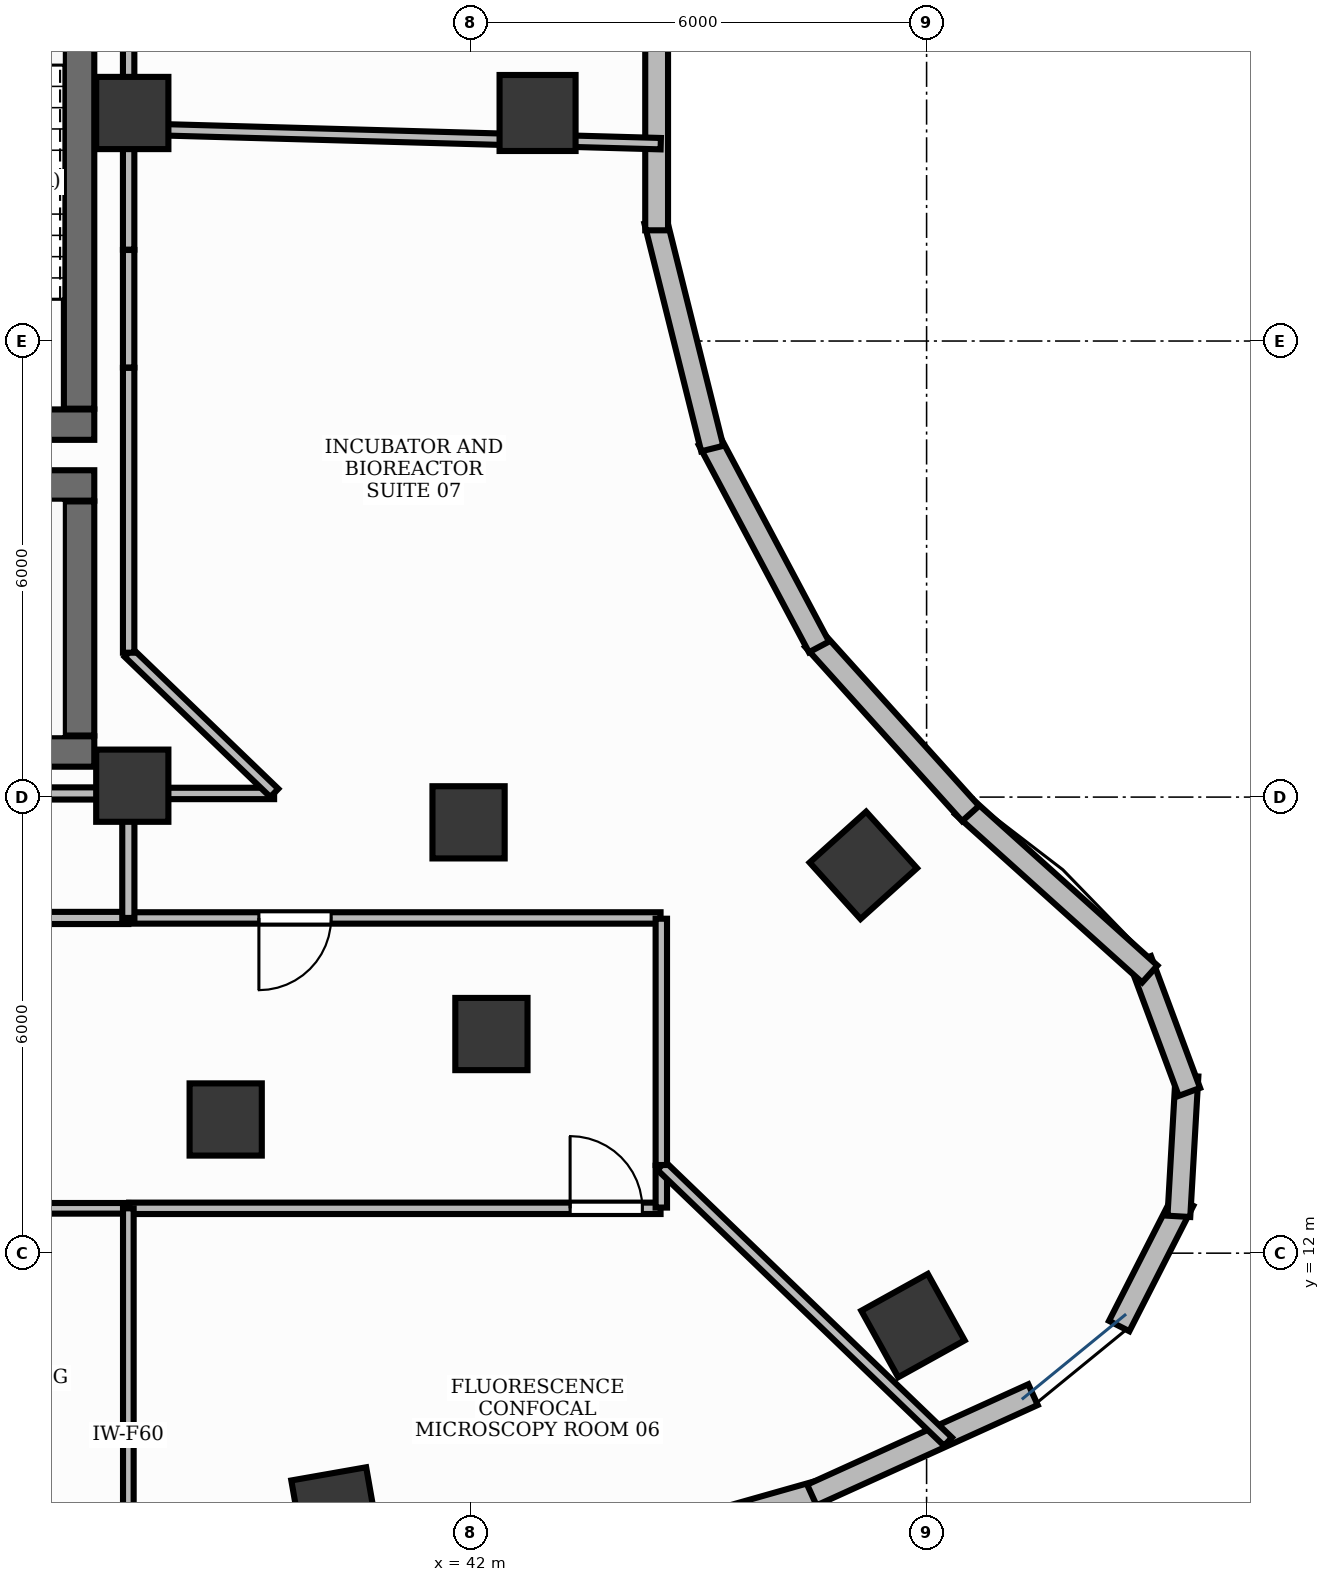
"""IFC4 building model, lengths in metres.
Left out: names, types, materials, properties, quantities, classifications, styles, units other than length and angle.
Written with IfcOpenShell. Run it as: python <this file> out.ifc"""

import sys

from ifc_helpers import new_model, si_unit, direction, frame, frame_2d, origin, origin_2d, place, context, subcontext, project, spatial, rectangle, extrude, element, fill, save


model = new_model("IFC4")
c1 = context("Model", 3, precision=1e-05, world=origin(), true_north=direction((0.0, 1.0)))
c2 = subcontext(c1, "Body", "Model", "MODEL_VIEW")
j1 = project(units=[si_unit("LENGTHUNIT", "METRE"), si_unit("PLANEANGLEUNIT", "RADIAN")], contexts=[c1])
p1 = place(None, origin())
s1 = spatial("IfcSite", under=j1, at=p1, CompositionType="ELEMENT")
p2 = place(p1, origin())
s2 = spatial("IfcBuilding", under=s1, at=p2, CompositionType="ELEMENT")
p3 = place(p2, frame((0.0, 0.0, 162.6)))
s3 = spatial("IfcBuildingStorey", under=s2, at=p3, CompositionType="ELEMENT", Elevation=162.6)
p4 = place(p3, frame((28.852, 18.6, 0.0), z_axis=(0.0, 0.0, 1.0), x_axis=(1.0, 0.0, 0.0)))
e1 = element("IfcWall", 1, at=p4, inside=s3, PredefinedType="SHEAR", context=c2, shape_type="SweptSolid", body=[
    extrude(rectangle(XDim=8.198, YDim=0.4, at=frame_2d((4.099, 0.0))), origin(), (0.0, 0.0, 1.0), 3.79),
])
p5 = place(p3, frame((28.4, 22.1, 0.0), z_axis=(0.0, 0.0, 1.0), x_axis=(1.0, 0.0, 0.0)))
e2 = element("IfcWall", 2, at=p5, inside=s3, PredefinedType="SHEAR", context=c2, shape_type="SweptSolid", body=[
    extrude(rectangle(XDim=8.65, YDim=0.4, at=frame_2d((4.325, 0.0))), origin(), (0.0, 0.0, 1.0), 3.79),
])
p6 = place(p3, frame((36.85, 18.81, 0.0), z_axis=(0.0, 0.0, 1.0), x_axis=(0.0, 1.0, 0.0)))
e3 = element("IfcWall", 3, at=p6, inside=s3, PredefinedType="SHEAR", context=c2, shape_type="SweptSolid", body=[
    extrude(rectangle(XDim=3.08, YDim=0.4, at=frame_2d((1.54, 0.0))), origin(), (0.0, 0.0, 1.0), 3.79),
])
p7 = place(p3, frame((33.15, 22.9, 0.0), z_axis=(0.0, 0.0, 1.0), x_axis=(1.0, 0.0, 0.0)))
e4 = element("IfcWall", 4, at=p7, inside=s3, PredefinedType="SHEAR", context=c2, shape_type="SweptSolid", body=[
    extrude(rectangle(XDim=3.9, YDim=0.4, at=frame_2d((1.95, 0.0))), origin(), (0.0, 0.0, 1.0), 3.79),
])
p8 = place(p3, frame((36.85, 23.11, 0.0), z_axis=(0.0, 0.0, 1.0), x_axis=(0.0, 1.0, 0.0)))
e5 = element("IfcWall", 5, at=p8, inside=s3, PredefinedType="SHEAR", context=c2, shape_type="SweptSolid", body=[
    extrude(rectangle(XDim=7.78, YDim=0.4, at=frame_2d((3.89, 0.0))), origin(), (0.0, 0.0, 1.0), 3.79),
])
for number, where, z_axis, x_axis in (
    (6, (37.55, 18.15, -0.0), (0.0, 0.0, 1.0), (1.0, 0.0, 0.0)),
    (7, (37.55, 27.0, -0.0), (0.0, 0.0, 1.0), (1.0, 0.0, 0.0)),
):
    element("IfcColumn", number, at=place(p3, frame(where, z_axis=z_axis, x_axis=x_axis)), inside=s3, PredefinedType="PILASTER", context=c2, shape_type="SweptSolid", body=[
        extrude(rectangle(XDim=0.95, YDim=0.95, at=origin_2d()), origin(), (0.0, 0.0, 1.0), 3.791),
    ])
p9 = place(p3, frame((40.221, 8.604, -0.0), z_axis=(0.0, 0.0, 1.0), x_axis=(0.984868307662, 0.173304404339, 0.0)))
e8 = element("IfcColumn", 8, at=p9, inside=s3, PredefinedType="COLUMN", context=c2, shape_type="SweptSolid", body=[
    extrude(rectangle(XDim=1.0, YDim=1.0, at=origin_2d()), origin(), (0.0, 0.0, 1.0), 3.791),
])
p10 = place(p3, frame((38.779, 13.759, -0.0), z_axis=(0.0, 0.0, 1.0), x_axis=(1.0, 0.0, 0.0)))
e9 = element("IfcColumn", 9, at=p10, inside=s3, PredefinedType="COLUMN", context=c2, shape_type="SweptSolid", body=[
    extrude(rectangle(XDim=0.95, YDim=0.95, at=origin_2d()), origin(), (0.0, 0.0, 1.0), 3.791),
])
p11 = place(p3, frame((47.821, 11.047, -0.0), z_axis=(0.0, 0.0, 1.0), x_axis=(0.874535078577, 0.484962262797, 0.0)))
e10 = element("IfcColumn", 10, at=p11, inside=s3, PredefinedType="COLUMN", context=c2, shape_type="SweptSolid", body=[
    extrude(rectangle(XDim=1.0, YDim=1.0, at=origin_2d()), origin(), (0.0, 0.0, 1.0), 3.791),
])
p12 = place(p3, frame((42.275, 14.883, -0.0), z_axis=(0.0, 0.0, 1.0), x_axis=(1.0, 0.0, 0.0)))
e11 = element("IfcColumn", 11, at=p12, inside=s3, PredefinedType="COLUMN", context=c2, shape_type="SweptSolid", body=[
    extrude(rectangle(XDim=0.95, YDim=0.95, at=origin_2d()), origin(), (0.0, 0.0, 1.0), 3.791),
])
p13 = place(p3, frame((47.167, 17.102, -0.0), z_axis=(0.0, 0.0, 1.0), x_axis=(-0.669130606359, 0.743144825477, 0.0)))
e12 = element("IfcColumn", 12, at=p13, inside=s3, PredefinedType="COLUMN", context=c2, shape_type="SweptSolid", body=[
    extrude(rectangle(XDim=1.0, YDim=1.0, at=origin_2d()), origin(), (0.0, 0.0, 1.0), 3.791),
])
p14 = place(p3, frame((41.974, 17.668, -0.0), z_axis=(0.0, 0.0, 1.0), x_axis=(1.0, 0.0, 0.0)))
e13 = element("IfcColumn", 13, at=p14, inside=s3, PredefinedType="COLUMN", context=c2, shape_type="SweptSolid", body=[
    extrude(rectangle(XDim=0.95, YDim=0.95, at=origin_2d()), origin(), (0.0, 0.0, 1.0), 3.791),
])
p15 = place(p3, frame((42.882, 27.0, -0.0), z_axis=(0.0, 0.0, 1.0), x_axis=(0.0, 1.0, 0.0)))
e14 = element("IfcColumn", 14, at=p15, inside=s3, PredefinedType="COLUMN", context=c2, shape_type="SweptSolid", body=[
    extrude(rectangle(XDim=1.0, YDim=1.0, at=origin_2d()), origin(), (0.0, 0.0, 1.0), 3.791),
])
p16 = place(p3, frame((40.493, 7.134, 0.0), z_axis=(0.0, 0.0, 1.0), x_axis=(0.962163849422, 0.272471515694, 0.0)))
e15 = element("IfcWall", 15, at=p16, inside=s3, PredefinedType="STANDARD", context=c2, shape_type="SweptSolid", body=[
    extrude(rectangle(XDim=6.409, YDim=0.3, at=frame_2d((3.205, 0.0))), origin(), (0.0, 0.0, 1.0), 3.79),
])
p17 = place(p3, frame((46.49, 8.818, 0.0), z_axis=(0.0, 0.0, 1.0), x_axis=(0.910633193525, 0.413215666268, 0.0)))
e16 = element("IfcWall", 16, at=p17, inside=s3, PredefinedType="STANDARD", context=c2, shape_type="SweptSolid", body=[
    extrude(rectangle(XDim=3.195, YDim=0.3, at=frame_2d((1.598, 0.0))), origin(), (0.0, 0.0, 1.0), 3.79),
])
for number, where, z_axis, x_axis in (
    (17, (50.534, 11.041, 0.0), (0.0, 0.0, 1.0), (0.454, 0.891, 0.0)),
    (18, (51.319, 12.484, 0.0), (0.0, 0.0, 1.0), (0.057, 0.998, 0.0)),
    (19, (51.458, 14.121, 0.0), (0.0, 0.0, 1.0), (-0.349, 0.937, 0.0)),
):
    element("IfcWall", number, at=place(p3, frame(where, z_axis=z_axis, x_axis=x_axis)), inside=s3, PredefinedType="STANDARD", context=c2, shape_type="SweptSolid", body=[
        extrude(rectangle(XDim=1.852, YDim=0.3, at=frame_2d((0.926, 0.0))), origin(), (0.0, 0.0, 1.0), 3.79),
    ])
p18 = place(p3, frame((50.936, 15.673, 0.0), z_axis=(0.0, 0.0, 1.0), x_axis=(-0.743341827472, 0.668911748687, 0.0)))
e20 = element("IfcWall", 20, at=p18, inside=s3, PredefinedType="STANDARD", context=c2, shape_type="SweptSolid", body=[
    extrude(rectangle(XDim=3.31, YDim=0.3, at=frame_2d((1.655, 0.0))), origin(), (0.0, 0.0, 1.0), 3.79),
])
for number, where, z_axis, x_axis in (
    (21, (48.579, 17.784, 0.0), (0.0, 0.0, 1.0), (-0.669, 0.743, 0.0)),
    (22, (46.584, 19.976, 0.0), (0.0, 0.0, 1.0), (-0.469, 0.883, 0.0)),
    (23, (45.18, 22.585, 0.0), (0.0, 0.0, 1.0), (-0.242, 0.97, 0.0)),
    (24, (44.448, 25.457, 0.0), (0.0, 0.0, 1.0), (0.0, 1.0, 0.0)),
):
    element("IfcWall", number, at=place(p3, frame(where, z_axis=z_axis, x_axis=x_axis)), inside=s3, PredefinedType="STANDARD", context=c2, shape_type="SweptSolid", body=[
        extrude(rectangle(XDim=3.087, YDim=0.3, at=frame_2d((1.543, 0.0))), origin(), (0.0, 0.0, 1.0), 3.79),
    ])
p19 = place(p3, frame((37.498, 16.41, 0.0), z_axis=(0.0, 0.0, 1.0), x_axis=(-1.0, 0.0, 0.0)))
e25 = element("IfcWall", 25, at=p19, inside=s3, PredefinedType="PARTITIONING", context=c2, shape_type="SweptSolid", body=[
    extrude(rectangle(XDim=8.498, YDim=0.16, at=frame_2d((4.249, 0.0))), origin(), (0.0, 0.0, 1.0), 2.8),
])
p20 = place(p19, frame((3.372, 0.0, 0.0)))
e26 = element("IfcOpeningElement", 26, at=p20, cuts=e25, PredefinedType="OPENING", context=c2, shape_type="SweptSolid", body=[
    extrude(rectangle(XDim=0.95, YDim=2.15, at=frame_2d((0.475, 1.075))), frame((0.0, 0.095, 0.0), z_axis=(0.0, -1.0, 0.0), x_axis=(1.0, 0.0, 0.0)), (0.0, 0.0, 1.0), 0.19),
])
p21 = place(p3, frame((32.695, 12.59, 0.0), z_axis=(0.0, 0.0, 1.0), x_axis=(1.0, 0.0, 0.0)))
e27 = element("IfcWall", 27, at=p21, inside=s3, PredefinedType="PARTITIONING", context=c2, shape_type="SweptSolid", body=[
    extrude(rectangle(XDim=4.803, YDim=0.14, at=frame_2d((2.401, 0.0))), origin(), (0.0, 0.0, 1.0), 2.8),
])
p22 = place(p21, frame((0.24, 0.0, 0.0)))
e28 = element("IfcOpeningElement", 28, at=p22, cuts=e27, PredefinedType="OPENING", context=c2, shape_type="SweptSolid", body=[
    extrude(rectangle(XDim=0.95, YDim=2.15, at=frame_2d((0.475, 1.075))), frame((0.0, 0.085, 0.0), z_axis=(0.0, -1.0, 0.0), x_axis=(1.0, 0.0, 0.0)), (0.0, 0.0, 1.0), 0.17),
])
p23 = place(p3, frame((37.508, 12.59, 0.0), z_axis=(0.0, 0.0, 1.0), x_axis=(1.0, 0.0, 0.0)))
e29 = element("IfcWall", 29, at=p23, inside=s3, PredefinedType="PARTITIONING", context=c2, shape_type="SweptSolid", body=[
    extrude(rectangle(XDim=6.992, YDim=0.15, at=frame_2d((3.496, 0.0))), origin(), (0.0, 0.0, 1.0), 2.8),
])
p24 = place(p23, frame((5.802, 0.0, 0.0)))
e30 = element("IfcOpeningElement", 30, at=p24, cuts=e29, PredefinedType="OPENING", context=c2, shape_type="SweptSolid", body=[
    extrude(rectangle(XDim=0.95, YDim=2.15, at=frame_2d((0.475, 1.075))), frame((0.0, 0.09, 0.0), z_axis=(0.0, -1.0, 0.0), x_axis=(1.0, 0.0, 0.0)), (0.0, 0.0, 1.0), 0.18),
])
p25 = place(p3, frame((44.5, 16.41, 0.0), z_axis=(0.0, 0.0, 1.0), x_axis=(-1.0, 0.0, 0.0)))
e31 = element("IfcWall", 31, at=p25, inside=s3, PredefinedType="PARTITIONING", context=c2, shape_type="SweptSolid", body=[
    extrude(rectangle(XDim=6.992, YDim=0.15, at=frame_2d((3.496, 0.0))), origin(), (0.0, 0.0, 1.0), 2.8),
])
p26 = place(p25, frame((4.334, 0.0, 0.0)))
e32 = element("IfcOpeningElement", 32, at=p26, cuts=e31, PredefinedType="OPENING", context=c2, shape_type="SweptSolid", body=[
    extrude(rectangle(XDim=0.95, YDim=2.15, at=frame_2d((0.475, 1.075))), frame((0.0, 0.09, 0.0), z_axis=(0.0, -1.0, 0.0), x_axis=(1.0, 0.0, 0.0)), (0.0, 0.0, 1.0), 0.18),
])
p27 = place(p3, frame((31.717, 18.048, 0.0), z_axis=(0.0, 0.0, 1.0), x_axis=(1.0, 0.0, 0.0)))
e33 = element("IfcWall", 33, at=p27, inside=s3, PredefinedType="PARTITIONING", context=c2, shape_type="SweptSolid", body=[
    extrude(rectangle(XDim=5.781, YDim=0.16, at=frame_2d((2.89, 0.0))), origin(), (0.0, 0.0, 1.0), 2.8),
])
p28 = place(p3, frame((37.498, 18.048, 0.0), z_axis=(0.0, 0.0, 1.0), x_axis=(0.0, -1.0, 0.0)))
e34 = element("IfcWall", 34, at=p28, inside=s3, PredefinedType="PARTITIONING", context=c2, shape_type="SweptSolid", body=[
    extrude(rectangle(XDim=1.638, YDim=0.16, at=frame_2d((0.819, 0.0))), origin(), (0.0, 0.0, 1.0), 2.8),
])
p29 = place(p3, frame((37.498, 12.59, 0.0), z_axis=(0.0, 0.0, 1.0), x_axis=(0.0, -1.0, 0.0)))
e35 = element("IfcWall", 35, at=p29, inside=s3, PredefinedType="PARTITIONING", context=c2, shape_type="SweptSolid", body=[
    extrude(rectangle(XDim=5.963, YDim=0.14, at=frame_2d((2.981, 0.0))), origin(), (0.0, 0.0, 1.0), 2.8),
])
p30 = place(p3, frame((44.51, 12.6, 0.0), z_axis=(0.0, 0.0, 1.0), x_axis=(0.0, 1.0, 0.0)))
e36 = element("IfcWall", 36, at=p30, inside=s3, PredefinedType="PARTITIONING", context=c2, shape_type="SweptSolid", body=[
    extrude(rectangle(XDim=0.55, YDim=0.15, at=frame_2d((0.275, 0.0))), origin(), (0.0, 0.0, 1.0), 2.8),
])
p31 = place(p3, frame((44.51, 13.15, 0.0), z_axis=(0.0, 0.0, 1.0), x_axis=(0.720549773239, -0.69340321912, 0.0)))
e37 = element("IfcWall", 37, at=p31, inside=s3, PredefinedType="PARTITIONING", context=c2, shape_type="SweptSolid", body=[
    extrude(rectangle(XDim=5.234, YDim=0.15, at=frame_2d((2.617, 0.0))), origin(), (0.0, 0.0, 1.0), 2.8),
])
p32 = place(p3, frame((37.502, 26.792, 0.0), z_axis=(0.0, 0.0, 1.0), x_axis=(0.999610026888, -0.027924794459, 0.0)))
e38 = element("IfcWall", 38, at=p32, inside=s3, PredefinedType="PARTITIONING", context=c2, shape_type="SweptSolid", body=[
    extrude(rectangle(XDim=7.003, YDim=0.15, at=frame_2d((3.501, 0.0))), origin(), (0.0, 0.0, 1.0), 2.8),
])
p33 = place(p3, frame((44.51, 13.16, 0.0), z_axis=(0.0, 0.0, 1.0), x_axis=(0.0, 1.0, 0.0)))
e39 = element("IfcWall", 39, at=p33, inside=s3, PredefinedType="PARTITIONING", context=c2, shape_type="SweptSolid", body=[
    extrude(rectangle(XDim=3.24, YDim=0.15, at=frame_2d((1.62, 0.0))), origin(), (0.0, 0.0, 1.0), 2.8),
])
p34 = place(p3, frame((37.508, 18.048, 0.0), z_axis=(0.0, 0.0, 1.0), x_axis=(1.0, 0.0, 0.0)))
e40 = element("IfcWall", 40, at=p34, inside=s3, PredefinedType="PARTITIONING", context=c2, shape_type="SweptSolid", body=[
    extrude(rectangle(XDim=1.908, YDim=0.15, at=frame_2d((0.954, 0.0))), origin(), (0.0, 0.0, 1.0), 2.8),
])
p35 = place(p3, frame((39.419, 18.055, 0.0), z_axis=(0.0, 0.0, 1.0), x_axis=(-0.720561375154, 0.693391162791, 0.0)))
e41 = element("IfcWall", 41, at=p35, inside=s3, PredefinedType="PARTITIONING", context=c2, shape_type="SweptSolid", body=[
    extrude(rectangle(XDim=2.66, YDim=0.15, at=frame_2d((1.33, 0.0))), origin(), (0.0, 0.0, 1.0), 2.8),
])
p36 = place(p3, frame((37.502, 19.899, 0.0), z_axis=(0.0, 0.0, 1.0), x_axis=(0.0, 1.0, 0.0)))
e42 = element("IfcWall", 42, at=p36, inside=s3, PredefinedType="PARTITIONING", context=c2, shape_type="SweptSolid", body=[
    extrude(rectangle(XDim=3.749, YDim=0.15, at=frame_2d((1.874, 0.0))), origin(), (0.0, 0.0, 1.0), 2.8),
])
p37 = place(p3, frame((37.502, 23.652, 0.0), z_axis=(0.0, 0.0, 1.0), x_axis=(0.0, 1.0, 0.0)))
e43 = element("IfcWall", 43, at=p37, inside=s3, PredefinedType="PARTITIONING", context=c2, shape_type="SweptSolid", body=[
    extrude(rectangle(XDim=1.546, YDim=0.15, at=frame_2d((0.773, 0.0))), origin(), (0.0, 0.0, 1.0), 2.8),
])
p38 = place(p3, frame((37.502, 25.202, 0.0), z_axis=(0.0, 0.0, 1.0), x_axis=(0.0, 1.0, 0.0)))
e44 = element("IfcWall", 44, at=p38, inside=s3, PredefinedType="PARTITIONING", context=c2, shape_type="SweptSolid", body=[
    extrude(rectangle(XDim=1.589, YDim=0.15, at=frame_2d((0.795, 0.0))), origin(), (0.0, 0.0, 1.0), 2.8),
])
p39 = place(p3, frame((37.502, 26.802, 0.0), z_axis=(0.0, 0.0, 1.0), x_axis=(0.0, 1.0, 0.0)))
e45 = element("IfcWall", 45, at=p39, inside=s3, PredefinedType="PARTITIONING", context=c2, shape_type="SweptSolid", body=[
    extrude(rectangle(XDim=8.107, YDim=0.15, at=frame_2d((4.053, 0.0))), origin(), (0.0, 0.0, 1.0), 2.8),
])
p40 = place(p24, origin())
e46 = element("IfcDoor", 46, at=p40, inside=s3, OperationType="SINGLE_SWING_LEFT", PredefinedType="DOOR", context=c2, shape_type="SweptSolid", body=[
    extrude(rectangle(XDim=0.95, YDim=2.15, at=frame_2d((0.475, 1.075))), frame((0.0, 0.025, 0.0), z_axis=(0.0, -1.0, 0.0), x_axis=(1.0, 0.0, 0.0)), (0.0, 0.0, 1.0), 0.05),
])
fill(e30, e46)
p41 = place(p26, origin())
e47 = element("IfcDoor", 47, at=p41, inside=s3, OperationType="SINGLE_SWING_RIGHT", PredefinedType="DOOR", context=c2, shape_type="SweptSolid", body=[
    extrude(rectangle(XDim=0.95, YDim=2.15, at=frame_2d((0.475, 1.075))), frame((0.0, 0.025, 0.0), z_axis=(0.0, -1.0, 0.0), x_axis=(1.0, 0.0, 0.0)), (0.0, 0.0, 1.0), 0.05),
])
fill(e32, e47)
save(model, sys.argv[1])
